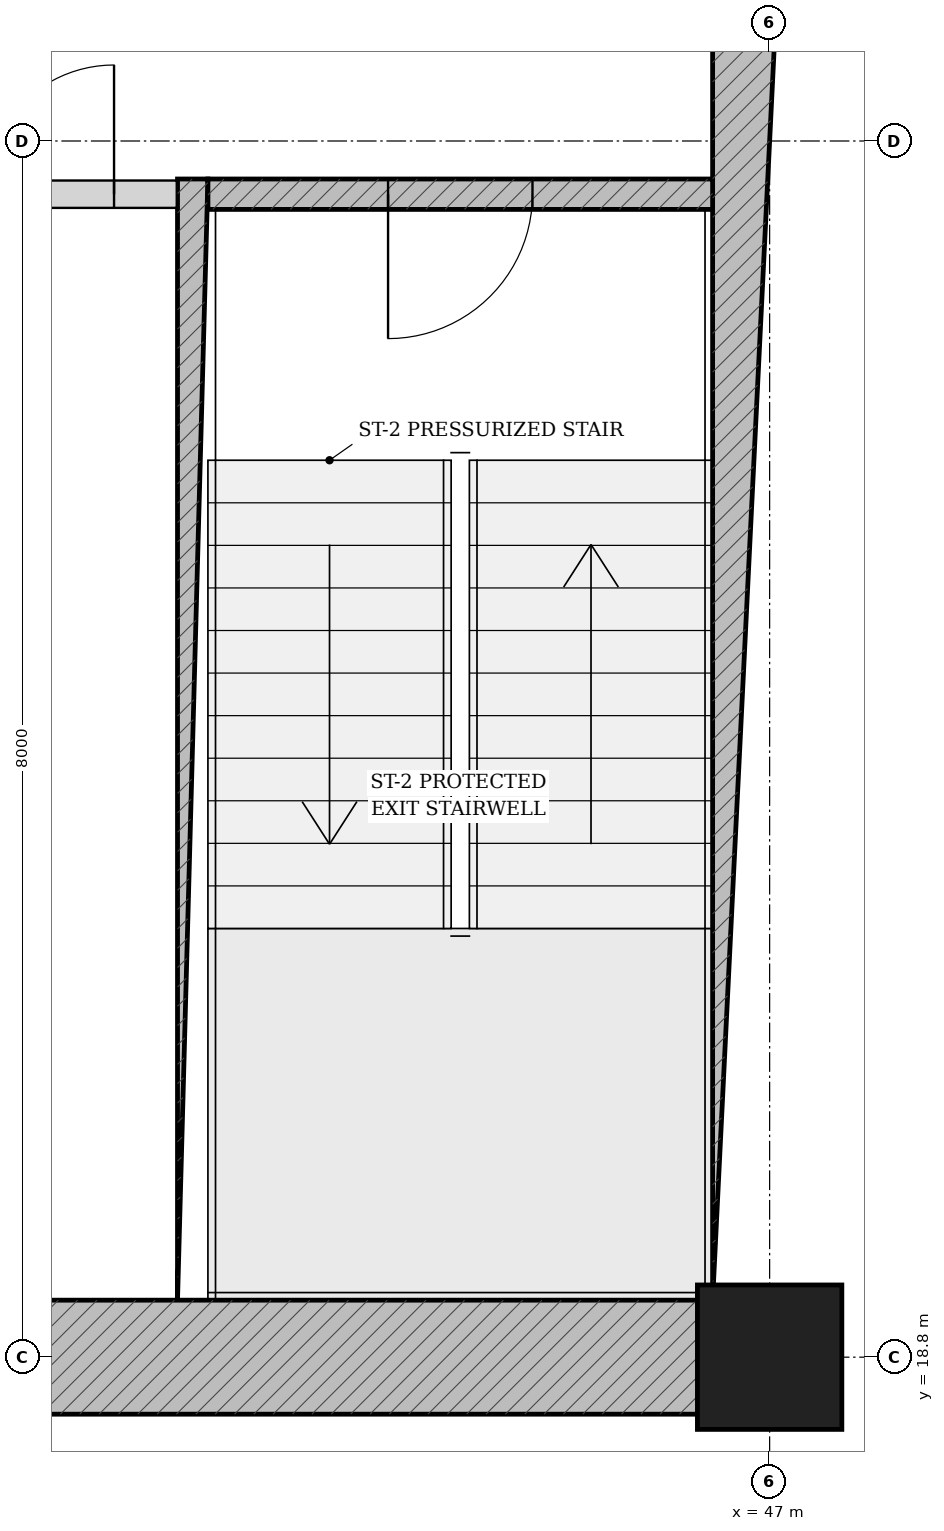
"""IFC4 building model, lengths in metres.
Left out: names, types, materials, properties, quantities, classifications, styles, units other than length and angle.
Written with IfcOpenShell. Run it as: python <this file> out.ifc"""

import sys

from ifc_helpers import new_model, si_unit, direction, frame, frame_2d, origin, origin_2d, place, context, subcontext, project, spatial, rectangle, extrude, source, transform, mapped, element, fill, save


model = new_model("IFC4")
c1 = context("Model", 3, precision=1e-05, world=origin(), true_north=direction((-0.2419218956, 0.970295726276)))
c2 = subcontext(c1, "Body", "Model", "MODEL_VIEW")
j1 = project(units=[si_unit("LENGTHUNIT", "METRE"), si_unit("PLANEANGLEUNIT", "RADIAN")], contexts=[c1])
p1 = place(None, origin())
s1 = spatial("IfcSite", under=j1, at=p1, CompositionType="ELEMENT")
p2 = place(p1, origin())
s2 = spatial("IfcBuilding", under=s1, at=p2, CompositionType="ELEMENT")
p3 = place(p2, frame((0.0, 0.0, -8.4)))
s3 = spatial("IfcBuildingStorey", under=s2, at=p3, CompositionType="ELEMENT", Elevation=-8.4)
p4 = place(p3, frame((47.0, 18.8, 0.0), z_axis=(0.0, 0.0, 1.0), x_axis=(1.0, 0.0, 0.0)))
e1 = element("IfcColumn", 1, at=p4, inside=s3, PredefinedType="COLUMN", context=c2, shape_type="SweptSolid", body=[
    extrude(rectangle(XDim=1.1, YDim=1.1, at=origin_2d()), origin(), (0.0, 0.0, 1.0), 4.2),
])
p5 = place(p3, frame((28.625, 18.8, 0.0), z_axis=(0.0, 0.0, 1.0), x_axis=(1.0, 0.0, 0.0)))
e2 = element("IfcWall", 2, at=p5, inside=s3, PredefinedType="SHEAR", context=c2, shape_type="SweptSolid", body=[
    extrude(rectangle(XDim=18.75, YDim=0.75, at=frame_2d((9.375, 0.0))), origin(), (0.0, 0.0, 1.0), 3.88),
])
p6 = place(p5, frame((8.95, 0.0, 0.0)))
e3 = element("IfcOpeningElement", 3, at=p6, cuts=e2, PredefinedType="OPENING", context=c2, shape_type="SweptSolid", body=[
    extrude(rectangle(XDim=0.85, YDim=2.1, at=frame_2d((0.425, 1.05))), frame((0.0, 0.385, 0.0), z_axis=(0.0, -1.0, 0.0), x_axis=(1.0, 0.0, 0.0)), (0.0, 0.0, 1.0), 0.77),
])
p7 = place(p3, frame((47.0, 19.175, 0.0), z_axis=(0.0, 0.0, 1.0), x_axis=(0.0, 1.0, 0.0)))
e4 = element("IfcWall", 4, at=p7, inside=s3, PredefinedType="SHEAR", context=c2, shape_type="SweptSolid", body=[
    extrude(rectangle(XDim=15.25, YDim=0.75, at=frame_2d((7.625, 0.0))), origin(), (0.0, 0.0, 1.0), 3.88),
])
p8 = place(p7, frame((9.875, 0.0, 0.0)))
e5 = element("IfcOpeningElement", 5, at=p8, cuts=e4, PredefinedType="OPENING", context=c2, shape_type="SweptSolid", body=[
    extrude(rectangle(XDim=1.5, YDim=2.2, at=frame_2d((0.75, 1.1))), frame((0.0, 0.385, 0.0), z_axis=(0.0, -1.0, 0.0), x_axis=(1.0, 0.0, 0.0)), (0.0, 0.0, 1.0), 0.77),
])
p9 = place(p3, frame((43.205, 19.175, 0.0), z_axis=(0.0, 0.0, 1.0), x_axis=(0.0, 1.0, 0.0)))
e6 = element("IfcWall", 6, at=p9, inside=s3, PredefinedType="SOLIDWALL", context=c2, shape_type="SweptSolid", body=[
    extrude(rectangle(XDim=7.375, YDim=0.2, at=frame_2d((3.688, 0.0))), origin(), (0.0, 0.0, 1.0), 3.88),
])
p10 = place(p3, frame((43.305, 26.45, 0.0), z_axis=(0.0, 0.0, 1.0), x_axis=(1.0, 0.0, 0.0)))
e7 = element("IfcWall", 7, at=p10, inside=s3, PredefinedType="SOLIDWALL", context=c2, shape_type="SweptSolid", body=[
    extrude(rectangle(XDim=3.32, YDim=0.2, at=frame_2d((1.66, 0.0))), origin(), (0.0, 0.0, 1.0), 3.88),
])
p11 = place(p10, frame((1.185, 0.0, 0.0)))
e8 = element("IfcOpeningElement", 8, at=p11, cuts=e7, PredefinedType="OPENING", context=c2, shape_type="SweptSolid", body=[
    extrude(rectangle(XDim=0.95, YDim=2.15, at=frame_2d((0.475, 1.075))), frame((0.0, 0.11, 0.0), z_axis=(0.0, -1.0, 0.0), x_axis=(1.0, 0.0, 0.0)), (0.0, 0.0, 1.0), 0.22),
])
p12 = place(p3, frame((41.425, 26.45, 0.0), z_axis=(0.0, 0.0, 1.0), x_axis=(1.0, 0.0, 0.0)))
e9 = element("IfcWall", 9, at=p12, inside=s3, PredefinedType="PARTITIONING", context=c2, shape_type="SweptSolid", body=[
    extrude(rectangle(XDim=1.675, YDim=0.18, at=frame_2d((0.837, 0.0))), origin(), (0.0, 0.0, 1.0), 3.88),
])
p13 = place(p12, frame((0.413, 0.0, 0.0)))
e10 = element("IfcOpeningElement", 10, at=p13, cuts=e9, PredefinedType="OPENING", context=c2, shape_type="SweptSolid", body=[
    extrude(rectangle(XDim=0.85, YDim=2.1, at=frame_2d((0.425, 1.05))), frame((0.0, 0.1, 0.0), z_axis=(0.0, -1.0, 0.0), x_axis=(1.0, 0.0, 0.0)), (0.0, 0.0, 1.0), 0.2),
])
m1 = source(origin(), c2, "Body", "SweptSolid", [
    extrude(rectangle(XDim=0.95, YDim=2.15, at=frame_2d((0.475, 1.075))), frame((0.0, 0.025, 0.0), z_axis=(0.0, -1.0, 0.0), x_axis=(1.0, 0.0, 0.0)), (0.0, 0.0, 1.0), 0.05),
])
p14 = place(p11, frame((0.95, 0.0, 0.0), z_axis=(0.0, 0.0, 1.0), x_axis=(-1.0, 0.0, 0.0)))
e11 = element("IfcDoor", 11, at=p14, inside=s3, OperationType="SINGLE_SWING_RIGHT", PredefinedType="DOOR", context=c2, shape_type="MappedRepresentation", body=[
    mapped(m1, transform((0.0, 0.0, 0.0), scale=1.0)),
])
fill(e8, e11)
m2 = source(origin(), c2, "Body", "SweptSolid", [
    extrude(rectangle(XDim=0.85, YDim=2.1, at=frame_2d((0.425, 1.05))), frame((0.0, 0.025, 0.0), z_axis=(0.0, -1.0, 0.0), x_axis=(1.0, 0.0, 0.0)), (0.0, 0.0, 1.0), 0.05),
])
p15 = place(p13, origin())
e12 = element("IfcDoor", 12, at=p15, inside=s3, OperationType="SINGLE_SWING_RIGHT", PredefinedType="DOOR", context=c2, shape_type="MappedRepresentation", body=[
    mapped(m2, transform((0.0, 0.0, 0.0), scale=1.0)),
])
fill(e10, e12)
save(model, sys.argv[1])
